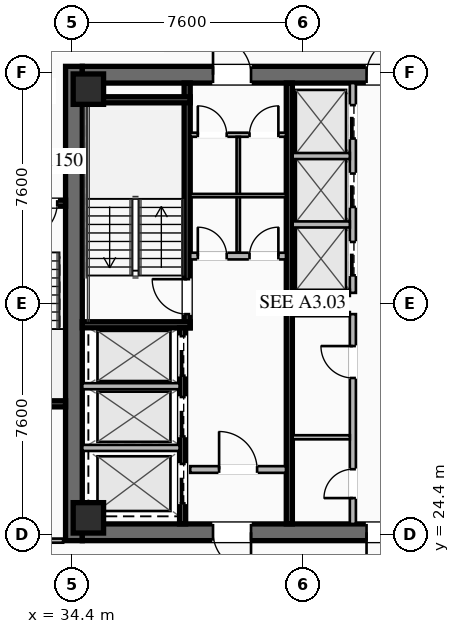
"""IFC4 building model, lengths in metres.
Left out: names, types, materials, properties, quantities, classifications, styles, units other than length and angle.
Written with IfcOpenShell. Run it as: python <this file> out.ifc"""

import sys

from ifc_helpers import new_model, si_unit, direction, frame, frame_2d, origin, origin_2d, place, context, subcontext, project, spatial, rectangle, hollow_rectangle, extrude, element, fill, save


model = new_model("IFC4")
c1 = context("Model", 3, precision=1e-05, world=origin(), true_north=direction((0.0, 1.0)))
c2 = subcontext(c1, "Body", "Model", "MODEL_VIEW")
j1 = project(units=[si_unit("LENGTHUNIT", "METRE"), si_unit("PLANEANGLEUNIT", "RADIAN")], contexts=[c1])
p1 = place(None, origin())
s1 = spatial("IfcSite", under=j1, at=p1, CompositionType="ELEMENT")
p2 = place(p1, origin())
s2 = spatial("IfcBuilding", under=s1, at=p2, CompositionType="ELEMENT")
p3 = place(p2, frame((0.0, 0.0, 174.75)))
s3 = spatial("IfcBuildingStorey", under=s2, at=p3, CompositionType="ELEMENT", Elevation=174.75)
p4 = place(p3, frame((34.475, 24.2, 0.0), z_axis=(0.0, 0.0, 1.0), x_axis=(0.0, 1.0, 0.0)))
e1 = element("IfcWall", 1, at=p4, inside=s3, PredefinedType="SHEAR", context=c2, shape_type="SweptSolid", body=[
    extrude(rectangle(XDim=15.6, YDim=0.55, at=frame_2d((7.8, 0.0))), origin(), (0.0, 0.0, 1.0), 3.55),
])
p5 = place(p3, frame((49.25, 24.475, 0.0), z_axis=(0.0, 0.0, 1.0), x_axis=(-1.0, 0.0, 0.0)))
e2 = element("IfcWall", 2, at=p5, inside=s3, PredefinedType="SHEAR", context=c2, shape_type="SweptSolid", body=[
    extrude(rectangle(XDim=14.5, YDim=0.55, at=frame_2d((7.25, 0.0))), origin(), (0.0, 0.0, 1.0), 3.55),
])
p6 = place(p5, frame((8.95, 0.0, 0.0)))
e3 = element("IfcOpeningElement", 3, at=p6, cuts=e2, PredefinedType="OPENING", context=c2, shape_type="SweptSolid", body=[
    extrude(rectangle(XDim=1.25, YDim=2.25, at=frame_2d((0.625, 1.125))), frame((0.0, 0.285, 0.0), z_axis=(0.0, -1.0, 0.0), x_axis=(1.0, 0.0, 0.0)), (0.0, 0.0, 1.0), 0.57),
])
p7 = place(p5, frame((3.9, 0.0, 0.0)))
e4 = element("IfcOpeningElement", 4, at=p7, cuts=e2, PredefinedType="OPENING", context=c2, shape_type="SweptSolid", body=[
    extrude(rectangle(XDim=1.25, YDim=2.25, at=frame_2d((0.625, 1.125))), frame((0.0, 0.285, 0.0), z_axis=(0.0, -1.0, 0.0), x_axis=(1.0, 0.0, 0.0)), (0.0, 0.0, 1.0), 0.57),
])
p8 = place(p3, frame((34.75, 39.525, 0.0), z_axis=(0.0, 0.0, 1.0), x_axis=(1.0, 0.0, 0.0)))
e5 = element("IfcWall", 5, at=p8, inside=s3, PredefinedType="SHEAR", context=c2, shape_type="SweptSolid", body=[
    extrude(rectangle(XDim=14.5, YDim=0.55, at=frame_2d((7.25, 0.0))), origin(), (0.0, 0.0, 1.0), 3.55),
])
p9 = place(p8, frame((4.3, 0.0, 0.0)))
e6 = element("IfcOpeningElement", 6, at=p9, cuts=e5, PredefinedType="OPENING", context=c2, shape_type="SweptSolid", body=[
    extrude(rectangle(XDim=1.25, YDim=2.25, at=frame_2d((0.625, 1.125))), frame((0.0, 0.285, 0.0), z_axis=(0.0, -1.0, 0.0), x_axis=(1.0, 0.0, 0.0)), (0.0, 0.0, 1.0), 0.57),
])
p10 = place(p8, frame((9.35, 0.0, 0.0)))
e7 = element("IfcOpeningElement", 7, at=p10, cuts=e5, PredefinedType="OPENING", context=c2, shape_type="SweptSolid", body=[
    extrude(rectangle(XDim=1.25, YDim=2.25, at=frame_2d((0.625, 1.125))), frame((0.0, 0.285, 0.0), z_axis=(0.0, -1.0, 0.0), x_axis=(1.0, 0.0, 0.0)), (0.0, 0.0, 1.0), 0.57),
])
for number, where, z_axis, x_axis in (
    (8, (34.95, 24.95, 0.0), (0.0, 0.0, 1.0), (1.0, 0.0, 0.0)),
    (9, (34.95, 39.05, 0.0), (0.0, 0.0, 1.0), (1.0, 0.0, 0.0)),
):
    element("IfcColumn", number, at=place(p3, frame(where, z_axis=z_axis, x_axis=x_axis)), inside=s3, PredefinedType="COLUMN", context=c2, shape_type="SweptSolid", body=[
        extrude(hollow_rectangle(XDim=1.0, YDim=1.0, WallThickness=0.04, at=origin_2d()), origin(), (0.0, 0.0, 1.0), 3.37),
    ])
p11 = place(p3, frame((38.2, 31.2, 0.0), z_axis=(0.0, 0.0, 1.0), x_axis=(0.0, 1.0, 0.0)))
e10 = element("IfcWall", 10, at=p11, inside=s3, PredefinedType="SHEAR", context=c2, shape_type="SweptSolid", body=[
    extrude(rectangle(XDim=8.05, YDim=0.2, at=frame_2d((4.025, 0.0))), origin(), (0.0, 0.0, 1.0), 3.37),
])
p12 = place(p11, frame((0.45, 0.0, 0.0)))
e11 = element("IfcOpeningElement", 11, at=p12, cuts=e10, PredefinedType="OPENING", context=c2, shape_type="SweptSolid", body=[
    extrude(rectangle(XDim=1.15, YDim=2.2, at=frame_2d((0.575, 1.1))), frame((0.0, 0.11, 0.0), z_axis=(0.0, -1.0, 0.0), x_axis=(1.0, 0.0, 0.0)), (0.0, 0.0, 1.0), 0.22),
])
for number, where, z_axis, x_axis in (
    (12, (34.75, 31.3, 0.0), (0.0, 0.0, 1.0), (1.0, 0.0, 0.0)),
    (13, (34.75, 38.7, 0.0), (0.0, 0.0, 1.0), (1.0, 0.0, 0.0)),
):
    element("IfcWall", number, at=place(p3, frame(where, z_axis=z_axis, x_axis=x_axis)), inside=s3, PredefinedType="SHEAR", context=c2, shape_type="SweptSolid", body=[
        extrude(rectangle(XDim=3.55, YDim=0.2, at=frame_2d((1.775, 0.0))), origin(), (0.0, 0.0, 1.0), 3.37),
    ])
p13 = place(p3, frame((41.56, 24.75, 0.0), z_axis=(0.0, 0.0, 1.0), x_axis=(0.0, 1.0, 0.0)))
e14 = element("IfcWall", 14, at=p13, inside=s3, PredefinedType="SHEAR", context=c2, shape_type="SweptSolid", body=[
    extrude(rectangle(XDim=14.5, YDim=0.2, at=frame_2d((7.25, 0.0))), origin(), (0.0, 0.0, 1.0), 3.37),
])
p14 = place(p3, frame((38.3, 33.56, 0.0), z_axis=(0.0, 0.0, 1.0), x_axis=(1.0, 0.0, 0.0)))
e15 = element("IfcWall", 15, at=p14, inside=s3, PredefinedType="SOLIDWALL", context=c2, shape_type="SweptSolid", body=[
    extrude(rectangle(XDim=3.15, YDim=0.22, at=frame_2d((1.575, 0.0))), origin(), (0.0, 0.0, 1.0), 2.723),
])
p15 = place(p14, frame((0.25, 0.0, 0.0)))
e16 = element("IfcOpeningElement", 16, at=p15, cuts=e15, PredefinedType="OPENING", context=c2, shape_type="SweptSolid", body=[
    extrude(rectangle(XDim=0.95, YDim=2.05, at=frame_2d((0.475, 1.025))), frame((0.0, 0.12, 0.0), z_axis=(0.0, -1.0, 0.0), x_axis=(1.0, 0.0, 0.0)), (0.0, 0.0, 1.0), 0.24),
])
p16 = place(p14, frame((1.95, 0.0, 0.0)))
e17 = element("IfcOpeningElement", 17, at=p16, cuts=e15, PredefinedType="OPENING", context=c2, shape_type="SweptSolid", body=[
    extrude(rectangle(XDim=0.95, YDim=2.05, at=frame_2d((0.475, 1.025))), frame((0.0, 0.12, 0.0), z_axis=(0.0, -1.0, 0.0), x_axis=(1.0, 0.0, 0.0)), (0.0, 0.0, 1.0), 0.24),
])
p17 = place(p3, frame((38.3, 26.54, 0.0), z_axis=(0.0, 0.0, 1.0), x_axis=(1.0, 0.0, 0.0)))
e18 = element("IfcWall", 18, at=p17, inside=s3, PredefinedType="SOLIDWALL", context=c2, shape_type="SweptSolid", body=[
    extrude(rectangle(XDim=3.15, YDim=0.22, at=frame_2d((1.575, 0.0))), origin(), (0.0, 0.0, 1.0), 2.723),
])
p18 = place(p17, frame((0.95, 0.0, 0.0)))
e19 = element("IfcOpeningElement", 19, at=p18, cuts=e18, PredefinedType="OPENING", context=c2, shape_type="SweptSolid", body=[
    extrude(rectangle(XDim=1.25, YDim=2.25, at=frame_2d((0.625, 1.125))), frame((0.0, 0.12, 0.0), z_axis=(0.0, -1.0, 0.0), x_axis=(1.0, 0.0, 0.0)), (0.0, 0.0, 1.0), 0.24),
])
p19 = place(p3, frame((38.05, 24.75, 0.0), z_axis=(0.0, 0.0, 1.0), x_axis=(0.0, 1.0, 0.0)))
e20 = element("IfcWall", 20, at=p19, inside=s3, PredefinedType="SHEAR", context=c2, shape_type="SweptSolid", body=[
    extrude(rectangle(XDim=6.45, YDim=0.2, at=frame_2d((3.225, 0.0))), origin(), (0.0, 0.0, 1.0), 3.37),
])
p20 = place(p19, frame((4.875, 0.0, 0.0)))
e21 = element("IfcOpeningElement", 21, at=p20, cuts=e20, PredefinedType="OPENING", context=c2, shape_type="SweptSolid", body=[
    extrude(rectangle(XDim=1.3, YDim=2.25, at=frame_2d((0.65, 1.125))), frame((0.0, 0.11, 0.0), z_axis=(0.0, -1.0, 0.0), x_axis=(1.0, 0.0, 0.0)), (0.0, 0.0, 1.0), 0.22),
])
p21 = place(p19, frame((2.875, 0.0, 0.0)))
e22 = element("IfcOpeningElement", 22, at=p21, cuts=e20, PredefinedType="OPENING", context=c2, shape_type="SweptSolid", body=[
    extrude(rectangle(XDim=1.3, YDim=2.25, at=frame_2d((0.65, 1.125))), frame((0.0, 0.11, 0.0), z_axis=(0.0, -1.0, 0.0), x_axis=(1.0, 0.0, 0.0)), (0.0, 0.0, 1.0), 0.22),
])
p22 = place(p19, frame((0.675, 0.0, 0.0)))
e23 = element("IfcOpeningElement", 23, at=p22, cuts=e20, PredefinedType="OPENING", context=c2, shape_type="SweptSolid", body=[
    extrude(rectangle(XDim=1.3, YDim=2.25, at=frame_2d((0.65, 1.125))), frame((0.0, 0.11, 0.0), z_axis=(0.0, -1.0, 0.0), x_axis=(1.0, 0.0, 0.0)), (0.0, 0.0, 1.0), 0.22),
])
for number, where, z_axis, x_axis in (
    (24, (34.75, 27.25, 0.0), (0.0, 0.0, 1.0), (1.0, 0.0, 0.0)),
    (25, (34.75, 29.28, 0.0), (0.0, 0.0, 1.0), (1.0, 0.0, 0.0)),
):
    element("IfcWall", number, at=place(p3, frame(where, z_axis=z_axis, x_axis=x_axis)), inside=s3, PredefinedType="SOLIDWALL", context=c2, shape_type="SweptSolid", body=[
        extrude(rectangle(XDim=3.2, YDim=0.2, at=frame_2d((1.6, 0.0))), origin(), (0.0, 0.0, 1.0), 3.37),
    ])
p23 = place(p3, frame((38.3, 37.55, 0.0), z_axis=(0.0, 0.0, 1.0), x_axis=(1.0, 0.0, 0.0)))
e26 = element("IfcWall", 26, at=p23, inside=s3, PredefinedType="PARTITIONING", context=c2, shape_type="SweptSolid", body=[
    extrude(rectangle(XDim=3.15, YDim=0.135, at=frame_2d((1.575, 0.0))), origin(), (0.0, 0.0, 1.0), 2.723),
])
p24 = place(p23, frame((0.25, 0.0, 0.0)))
e27 = element("IfcOpeningElement", 27, at=p24, cuts=e26, PredefinedType="OPENING", context=c2, shape_type="SweptSolid", body=[
    extrude(rectangle(XDim=0.95, YDim=2.05, at=frame_2d((0.475, 1.025))), frame((0.0, 0.077, 0.0), z_axis=(0.0, -1.0, 0.0), x_axis=(1.0, 0.0, 0.0)), (0.0, 0.0, 1.0), 0.155),
])
p25 = place(p23, frame((1.95, 0.0, 0.0)))
e28 = element("IfcOpeningElement", 28, at=p25, cuts=e26, PredefinedType="OPENING", context=c2, shape_type="SweptSolid", body=[
    extrude(rectangle(XDim=0.95, YDim=2.05, at=frame_2d((0.475, 1.025))), frame((0.0, 0.077, 0.0), z_axis=(0.0, -1.0, 0.0), x_axis=(1.0, 0.0, 0.0)), (0.0, 0.0, 1.0), 0.155),
])
p26 = place(p3, frame((39.88, 33.68, 0.0), z_axis=(0.0, 0.0, 1.0), x_axis=(0.0, 1.0, 0.0)))
e29 = element("IfcWall", 29, at=p26, inside=s3, PredefinedType="PARTITIONING", context=c2, shape_type="SweptSolid", body=[
    extrude(rectangle(XDim=3.8, YDim=0.11, at=frame_2d((1.9, 0.0))), origin(), (0.0, 0.0, 1.0), 2.723),
])
p27 = place(p3, frame((38.3, 35.55, 0.0), z_axis=(0.0, 0.0, 1.0), x_axis=(1.0, 0.0, 0.0)))
e30 = element("IfcWall", 30, at=p27, inside=s3, PredefinedType="PARTITIONING", context=c2, shape_type="SweptSolid", body=[
    extrude(rectangle(XDim=3.15, YDim=0.11, at=frame_2d((1.575, 0.0))), origin(), (0.0, 0.0, 1.0), 2.723),
])
p28 = place(p3, frame((43.65, 24.75, 0.0), z_axis=(0.0, 0.0, 1.0), x_axis=(0.0, 1.0, 0.0)))
e31 = element("IfcWall", 31, at=p28, inside=s3, PredefinedType="SOLIDWALL", context=c2, shape_type="SweptSolid", body=[
    extrude(rectangle(XDim=6.9, YDim=0.2, at=frame_2d((3.45, 0.0))), origin(), (0.0, 0.0, 1.0), 2.723),
])
p29 = place(p28, frame((0.85, 0.0, 0.0)))
e32 = element("IfcOpeningElement", 32, at=p29, cuts=e31, PredefinedType="OPENING", context=c2, shape_type="SweptSolid", body=[
    extrude(rectangle(XDim=0.95, YDim=2.05, at=frame_2d((0.475, 1.025))), frame((0.0, 0.11, 0.0), z_axis=(0.0, -1.0, 0.0), x_axis=(1.0, 0.0, 0.0)), (0.0, 0.0, 1.0), 0.22),
])
p30 = place(p28, frame((4.8, 0.0, 0.0)))
e33 = element("IfcOpeningElement", 33, at=p30, cuts=e31, PredefinedType="OPENING", context=c2, shape_type="SweptSolid", body=[
    extrude(rectangle(XDim=1.05, YDim=2.2, at=frame_2d((0.525, 1.1))), frame((0.0, 0.11, 0.0), z_axis=(0.0, -1.0, 0.0), x_axis=(1.0, 0.0, 0.0)), (0.0, 0.0, 1.0), 0.22),
])
for number, where, z_axis, x_axis in (
    (34, (41.67, 31.65, 0.0), (0.0, 0.0, 1.0), (1.0, 0.0, 0.0)),
    (35, (41.67, 27.6, 0.0), (0.0, 0.0, 1.0), (1.0, 0.0, 0.0)),
):
    element("IfcWall", number, at=place(p3, frame(where, z_axis=z_axis, x_axis=x_axis)), inside=s3, PredefinedType="PARTITIONING", context=c2, shape_type="SweptSolid", body=[
        extrude(rectangle(XDim=1.88, YDim=0.135, at=frame_2d((0.94, 0.0))), origin(), (0.0, 0.0, 1.0), 2.723),
    ])
p31 = place(p3, frame((43.65, 32.35, 0.0), z_axis=(0.0, 0.0, 1.0), x_axis=(0.0, 1.0, 0.0)))
e36 = element("IfcWall", 36, at=p31, inside=s3, PredefinedType="SOLIDWALL", context=c2, shape_type="SweptSolid", body=[
    extrude(rectangle(XDim=6.9, YDim=0.2, at=frame_2d((3.45, 0.0))), origin(), (0.0, 0.0, 1.0), 3.37),
])
p32 = place(p31, frame((0.575, 0.0, 0.0)))
e37 = element("IfcOpeningElement", 37, at=p32, cuts=e36, PredefinedType="OPENING", context=c2, shape_type="SweptSolid", body=[
    extrude(rectangle(XDim=1.1, YDim=2.2, at=frame_2d((0.55, 1.1))), frame((0.0, 0.11, 0.0), z_axis=(0.0, -1.0, 0.0), x_axis=(1.0, 0.0, 0.0)), (0.0, 0.0, 1.0), 0.22),
])
p33 = place(p31, frame((2.825, 0.0, 0.0)))
e38 = element("IfcOpeningElement", 38, at=p33, cuts=e36, PredefinedType="OPENING", context=c2, shape_type="SweptSolid", body=[
    extrude(rectangle(XDim=1.1, YDim=2.2, at=frame_2d((0.55, 1.1))), frame((0.0, 0.11, 0.0), z_axis=(0.0, -1.0, 0.0), x_axis=(1.0, 0.0, 0.0)), (0.0, 0.0, 1.0), 0.22),
])
p34 = place(p31, frame((5.075, 0.0, 0.0)))
e39 = element("IfcOpeningElement", 39, at=p34, cuts=e36, PredefinedType="OPENING", context=c2, shape_type="SweptSolid", body=[
    extrude(rectangle(XDim=1.1, YDim=2.2, at=frame_2d((0.55, 1.1))), frame((0.0, 0.11, 0.0), z_axis=(0.0, -1.0, 0.0), x_axis=(1.0, 0.0, 0.0)), (0.0, 0.0, 1.0), 0.22),
])
for number, where, z_axis, x_axis in (
    (40, (41.67, 32.35, 0.0), (0.0, 0.0, 1.0), (1.0, 0.0, 0.0)),
    (41, (41.67, 34.6, 0.0), (0.0, 0.0, 1.0), (1.0, 0.0, 0.0)),
    (42, (41.67, 36.85, 0.0), (0.0, 0.0, 1.0), (1.0, 0.0, 0.0)),
):
    element("IfcWall", number, at=place(p3, frame(where, z_axis=z_axis, x_axis=x_axis)), inside=s3, PredefinedType="SOLIDWALL", context=c2, shape_type="SweptSolid", body=[
        extrude(rectangle(XDim=1.88, YDim=0.2, at=frame_2d((0.94, 0.0))), origin(), (0.0, 0.0, 1.0), 3.37),
    ])
p35 = place(p3, frame((34.2, 35.3, 0.0), z_axis=(0.0, 0.0, 1.0), x_axis=(-1.0, 0.0, 0.0)))
e43 = element("IfcWall", 43, at=p35, inside=s3, PredefinedType="SHEAR", context=c2, shape_type="SweptSolid", body=[
    extrude(rectangle(XDim=3.4, YDim=0.2, at=frame_2d((1.7, 0.0))), origin(), (0.0, 0.0, 1.0), 3.37),
])
p36 = place(p35, frame((0.275, 0.0, 0.0)))
e44 = element("IfcOpeningElement", 44, at=p36, cuts=e43, PredefinedType="OPENING", context=c2, shape_type="SweptSolid", body=[
    extrude(rectangle(XDim=1.15, YDim=2.2, at=frame_2d((0.575, 1.1))), frame((0.0, 0.11, 0.0), z_axis=(0.0, -1.0, 0.0), x_axis=(1.0, 0.0, 0.0)), (0.0, 0.0, 1.0), 0.22),
])
p37 = place(p3, frame((30.8, 28.7, 0.0), z_axis=(0.0, 0.0, 1.0), x_axis=(1.0, 0.0, 0.0)))
e45 = element("IfcWall", 45, at=p37, inside=s3, PredefinedType="SHEAR", context=c2, shape_type="SweptSolid", body=[
    extrude(rectangle(XDim=3.4, YDim=0.2, at=frame_2d((1.7, 0.0))), origin(), (0.0, 0.0, 1.0), 3.37),
])
p38 = place(p3, frame((24.32, 24.2, 0.0), z_axis=(0.0, 0.0, 1.0), x_axis=(1.0, 0.0, 0.0)))
e46 = element("IfcWall", 46, at=p38, inside=s3, PredefinedType="PARTITIONING", context=c2, shape_type="SweptSolid", body=[
    extrude(rectangle(XDim=9.8, YDim=0.135, at=frame_2d((4.9, 0.0))), origin(), (0.0, 0.0, 1.0), 2.723),
])
p39 = place(p38, frame((6.805, 0.0, 0.0)))
e47 = element("IfcOpeningElement", 47, at=p39, cuts=e46, PredefinedType="OPENING", context=c2, shape_type="SweptSolid", body=[
    extrude(rectangle(XDim=0.95, YDim=2.05, at=frame_2d((0.475, 1.025))), frame((0.0, 0.077, 0.0), z_axis=(0.0, -1.0, 0.0), x_axis=(1.0, 0.0, 0.0)), (0.0, 0.0, 1.0), 0.155),
])
p40 = place(p9, origin())
e48 = element("IfcDoor", 48, at=p40, inside=s3, OperationType="SINGLE_SWING_LEFT", PredefinedType="DOOR", context=c2, shape_type="SweptSolid", body=[
    extrude(rectangle(XDim=1.25, YDim=2.25, at=frame_2d((0.625, 1.125))), frame((0.0, 0.025, 0.0), z_axis=(0.0, -1.0, 0.0), x_axis=(1.0, 0.0, 0.0)), (0.0, 0.0, 1.0), 0.05),
])
fill(e6, e48)
p41 = place(p10, origin())
e49 = element("IfcDoor", 49, at=p41, inside=s3, OperationType="SINGLE_SWING_RIGHT", PredefinedType="DOOR", context=c2, shape_type="SweptSolid", body=[
    extrude(rectangle(XDim=1.25, YDim=2.25, at=frame_2d((0.625, 1.125))), frame((0.0, 0.025, 0.0), z_axis=(0.0, -1.0, 0.0), x_axis=(1.0, 0.0, 0.0)), (0.0, 0.0, 1.0), 0.05),
])
fill(e7, e49)
p42 = place(p6, origin())
e50 = element("IfcDoor", 50, at=p42, inside=s3, OperationType="SINGLE_SWING_LEFT", PredefinedType="DOOR", context=c2, shape_type="SweptSolid", body=[
    extrude(rectangle(XDim=1.25, YDim=2.25, at=frame_2d((0.625, 1.125))), frame((0.0, 0.025, 0.0), z_axis=(0.0, -1.0, 0.0), x_axis=(1.0, 0.0, 0.0)), (0.0, 0.0, 1.0), 0.05),
])
fill(e3, e50)
p43 = place(p7, origin())
e51 = element("IfcDoor", 51, at=p43, inside=s3, OperationType="SINGLE_SWING_RIGHT", PredefinedType="DOOR", context=c2, shape_type="SweptSolid", body=[
    extrude(rectangle(XDim=1.25, YDim=2.25, at=frame_2d((0.625, 1.125))), frame((0.0, 0.025, 0.0), z_axis=(0.0, -1.0, 0.0), x_axis=(1.0, 0.0, 0.0)), (0.0, 0.0, 1.0), 0.05),
])
fill(e4, e51)
p44 = place(p12, origin())
e52 = element("IfcDoor", 52, at=p44, inside=s3, OperationType="SINGLE_SWING_RIGHT", PredefinedType="DOOR", context=c2, shape_type="SweptSolid", body=[
    extrude(rectangle(XDim=1.15, YDim=2.2, at=frame_2d((0.575, 1.1))), frame((0.0, 0.025, 0.0), z_axis=(0.0, -1.0, 0.0), x_axis=(1.0, 0.0, 0.0)), (0.0, 0.0, 1.0), 0.05),
])
fill(e11, e52)
p45 = place(p18, origin())
e53 = element("IfcDoor", 53, at=p45, inside=s3, OperationType="SINGLE_SWING_LEFT", PredefinedType="DOOR", context=c2, shape_type="SweptSolid", body=[
    extrude(rectangle(XDim=1.25, YDim=2.25, at=frame_2d((0.625, 1.125))), frame((0.0, 0.025, 0.0), z_axis=(0.0, -1.0, 0.0), x_axis=(1.0, 0.0, 0.0)), (0.0, 0.0, 1.0), 0.05),
])
fill(e19, e53)
p46 = place(p24, origin())
e54 = element("IfcDoor", 54, at=p46, inside=s3, OperationType="SINGLE_SWING_LEFT", PredefinedType="DOOR", context=c2, shape_type="SweptSolid", body=[
    extrude(rectangle(XDim=0.95, YDim=2.05, at=frame_2d((0.475, 1.025))), frame((0.0, 0.025, 0.0), z_axis=(0.0, -1.0, 0.0), x_axis=(1.0, 0.0, 0.0)), (0.0, 0.0, 1.0), 0.05),
])
fill(e27, e54)
p47 = place(p25, origin())
e55 = element("IfcDoor", 55, at=p47, inside=s3, OperationType="SINGLE_SWING_RIGHT", PredefinedType="DOOR", context=c2, shape_type="SweptSolid", body=[
    extrude(rectangle(XDim=0.95, YDim=2.05, at=frame_2d((0.475, 1.025))), frame((0.0, 0.025, 0.0), z_axis=(0.0, -1.0, 0.0), x_axis=(1.0, 0.0, 0.0)), (0.0, 0.0, 1.0), 0.05),
])
fill(e28, e55)
p48 = place(p15, origin())
e56 = element("IfcDoor", 56, at=p48, inside=s3, OperationType="SINGLE_SWING_LEFT", PredefinedType="DOOR", context=c2, shape_type="SweptSolid", body=[
    extrude(rectangle(XDim=0.95, YDim=2.05, at=frame_2d((0.475, 1.025))), frame((0.0, 0.025, 0.0), z_axis=(0.0, -1.0, 0.0), x_axis=(1.0, 0.0, 0.0)), (0.0, 0.0, 1.0), 0.05),
])
fill(e16, e56)
p49 = place(p16, origin())
e57 = element("IfcDoor", 57, at=p49, inside=s3, OperationType="SINGLE_SWING_RIGHT", PredefinedType="DOOR", context=c2, shape_type="SweptSolid", body=[
    extrude(rectangle(XDim=0.95, YDim=2.05, at=frame_2d((0.475, 1.025))), frame((0.0, 0.025, 0.0), z_axis=(0.0, -1.0, 0.0), x_axis=(1.0, 0.0, 0.0)), (0.0, 0.0, 1.0), 0.05),
])
fill(e17, e57)
p50 = place(p29, origin())
e58 = element("IfcDoor", 58, at=p50, inside=s3, OperationType="SINGLE_SWING_LEFT", PredefinedType="DOOR", context=c2, shape_type="SweptSolid", body=[
    extrude(rectangle(XDim=0.95, YDim=2.05, at=frame_2d((0.475, 1.025))), frame((0.0, 0.025, 0.0), z_axis=(0.0, -1.0, 0.0), x_axis=(1.0, 0.0, 0.0)), (0.0, 0.0, 1.0), 0.05),
])
fill(e32, e58)
p51 = place(p30, origin())
e59 = element("IfcDoor", 59, at=p51, inside=s3, OperationType="SINGLE_SWING_RIGHT", PredefinedType="DOOR", context=c2, shape_type="SweptSolid", body=[
    extrude(rectangle(XDim=1.05, YDim=2.2, at=frame_2d((0.525, 1.1))), frame((0.0, 0.025, 0.0), z_axis=(0.0, -1.0, 0.0), x_axis=(1.0, 0.0, 0.0)), (0.0, 0.0, 1.0), 0.05),
])
fill(e33, e59)
p52 = place(p36, origin())
e60 = element("IfcDoor", 60, at=p52, inside=s3, OperationType="SINGLE_SWING_RIGHT", PredefinedType="DOOR", context=c2, shape_type="SweptSolid", body=[
    extrude(rectangle(XDim=1.15, YDim=2.2, at=frame_2d((0.575, 1.1))), frame((0.0, 0.025, 0.0), z_axis=(0.0, -1.0, 0.0), x_axis=(1.0, 0.0, 0.0)), (0.0, 0.0, 1.0), 0.05),
])
fill(e44, e60)
p53 = place(p20, origin())
e61 = element("IfcDoor", 61, at=p53, inside=s3, OperationType="SLIDING_TO_LEFT", PredefinedType="DOOR", context=c2, shape_type="SweptSolid", body=[
    extrude(rectangle(XDim=1.3, YDim=2.25, at=frame_2d((0.65, 1.125))), frame((0.0, 0.025, 0.0), z_axis=(0.0, -1.0, 0.0), x_axis=(1.0, 0.0, 0.0)), (0.0, 0.0, 1.0), 0.05),
])
fill(e21, e61)
p54 = place(p21, origin())
e62 = element("IfcDoor", 62, at=p54, inside=s3, OperationType="SLIDING_TO_LEFT", PredefinedType="DOOR", context=c2, shape_type="SweptSolid", body=[
    extrude(rectangle(XDim=1.3, YDim=2.25, at=frame_2d((0.65, 1.125))), frame((0.0, 0.025, 0.0), z_axis=(0.0, -1.0, 0.0), x_axis=(1.0, 0.0, 0.0)), (0.0, 0.0, 1.0), 0.05),
])
fill(e22, e62)
p55 = place(p22, origin())
e63 = element("IfcDoor", 63, at=p55, inside=s3, OperationType="SLIDING_TO_LEFT", PredefinedType="DOOR", context=c2, shape_type="SweptSolid", body=[
    extrude(rectangle(XDim=1.3, YDim=2.25, at=frame_2d((0.65, 1.125))), frame((0.0, 0.025, 0.0), z_axis=(0.0, -1.0, 0.0), x_axis=(1.0, 0.0, 0.0)), (0.0, 0.0, 1.0), 0.05),
])
fill(e23, e63)
p56 = place(p32, origin())
e64 = element("IfcDoor", 64, at=p56, inside=s3, OperationType="SLIDING_TO_LEFT", PredefinedType="DOOR", context=c2, shape_type="SweptSolid", body=[
    extrude(rectangle(XDim=1.1, YDim=2.2, at=frame_2d((0.55, 1.1))), frame((0.0, 0.025, 0.0), z_axis=(0.0, -1.0, 0.0), x_axis=(1.0, 0.0, 0.0)), (0.0, 0.0, 1.0), 0.05),
])
fill(e37, e64)
p57 = place(p33, origin())
e65 = element("IfcDoor", 65, at=p57, inside=s3, OperationType="SLIDING_TO_LEFT", PredefinedType="DOOR", context=c2, shape_type="SweptSolid", body=[
    extrude(rectangle(XDim=1.1, YDim=2.2, at=frame_2d((0.55, 1.1))), frame((0.0, 0.025, 0.0), z_axis=(0.0, -1.0, 0.0), x_axis=(1.0, 0.0, 0.0)), (0.0, 0.0, 1.0), 0.05),
])
fill(e38, e65)
p58 = place(p34, origin())
e66 = element("IfcDoor", 66, at=p58, inside=s3, OperationType="SLIDING_TO_LEFT", PredefinedType="DOOR", context=c2, shape_type="SweptSolid", body=[
    extrude(rectangle(XDim=1.1, YDim=2.2, at=frame_2d((0.55, 1.1))), frame((0.0, 0.025, 0.0), z_axis=(0.0, -1.0, 0.0), x_axis=(1.0, 0.0, 0.0)), (0.0, 0.0, 1.0), 0.05),
])
fill(e39, e66)
save(model, sys.argv[1])
